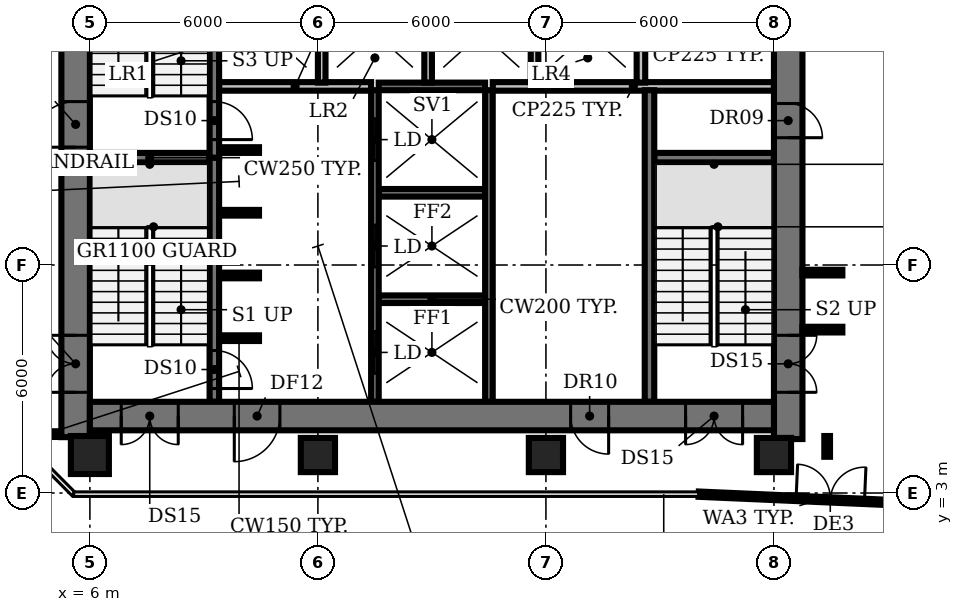
"""IFC4 building model, lengths in metres.
Left out: names, types, materials, properties, quantities, classifications, styles, units other than length and angle.
Written with IfcOpenShell. Run it as: python <this file> out.ifc"""

import sys

from ifc_helpers import new_model, si_unit, direction, frame, frame_2d, origin, origin_2d, place, context, subcontext, project, spatial, rectangle, circle, extrude, element, fill, save


model = new_model("IFC4")
c1 = context("Model", 3, precision=1e-05, world=origin(), true_north=direction((0.0, 1.0)))
c2 = subcontext(c1, "Body", "Model", "MODEL_VIEW")
j1 = project(units=[si_unit("LENGTHUNIT", "METRE"), si_unit("PLANEANGLEUNIT", "RADIAN")], contexts=[c1])
p1 = place(None, origin())
s1 = spatial("IfcSite", under=j1, at=p1, CompositionType="ELEMENT")
p2 = place(p1, origin())
s2 = spatial("IfcBuilding", under=s1, at=p2, CompositionType="ELEMENT")
p3 = place(p2, frame((0.0, 0.0, 121.4)))
s3 = spatial("IfcBuildingStorey", under=s2, at=p3, CompositionType="ELEMENT", Elevation=121.4)
p4 = place(p3, frame((6.0, 4.0, 0.0), z_axis=(0.0, 0.0, 1.0), x_axis=(1.0, 0.0, 0.0)))
e1 = element("IfcColumn", 1, at=p4, inside=s3, PredefinedType="COLUMN", context=c2, shape_type="SweptSolid", body=[
    extrude(circle(Radius=0.5, at=origin_2d()), origin(), (0.0, 0.0, 1.0), 3.85),
])
for number, where, z_axis, x_axis in (
    (2, (12.0, 4.0, 0.0), (0.0, 0.0, 1.0), (1.0, 0.0, 0.0)),
    (3, (18.0, 4.0, 0.0), (0.0, 0.0, 1.0), (1.0, 0.0, 0.0)),
    (4, (24.0, 4.0, 0.0), (0.0, 0.0, 1.0), (1.0, 0.0, 0.0)),
):
    element("IfcColumn", number, at=place(p3, frame(where, z_axis=z_axis, x_axis=x_axis)), inside=s3, PredefinedType="COLUMN", context=c2, shape_type="SweptSolid", body=[
        extrude(rectangle(XDim=0.9, YDim=0.9, at=origin_2d()), origin(), (0.0, 0.0, 1.0), 3.85),
    ])
p5 = place(p3, frame((22.02, 2.97, 0.0), z_axis=(0.0, 0.0, 1.0), x_axis=(0.999048576726, -0.043611252471, 0.0)))
e5 = element("IfcWall", 5, at=p5, inside=s3, PredefinedType="SOLIDWALL", context=c2, shape_type="SweptSolid", body=[
    extrude(rectangle(XDim=6.332, YDim=0.14, at=frame_2d((3.166, 0.0))), origin(), (0.0, 0.0, 1.0), 3.85),
])
p6 = place(p5, frame((2.566, 0.0, 0.0)))
e6 = element("IfcOpeningElement", 6, at=p6, cuts=e5, PredefinedType="OPENING", context=c2, shape_type="SweptSolid", body=[
    extrude(rectangle(XDim=1.8, YDim=2.4, at=frame_2d((0.9, 1.2))), frame((0.0, 0.08, 0.0), z_axis=(0.0, -1.0, 0.0), x_axis=(1.0, 0.0, 0.0)), (0.0, 0.0, 1.0), 0.16),
])
p7 = place(p3, frame((9.4, 7.075, 0.0), z_axis=(0.0, 0.0, 1.0), x_axis=(1.0, 0.0, 0.0)))
e7 = element("IfcWall", 7, at=p7, inside=s3, PredefinedType="SHEAR", context=c2, shape_type="SweptSolid", body=[
    extrude(rectangle(XDim=1.05, YDim=0.15, at=frame_2d((0.525, 0.0))), origin(), (0.0, 0.0, 1.0), 3.85),
])
p8 = place(p3, frame((13.6, 8.1, 0.0), z_axis=(0.0, 0.0, 1.0), x_axis=(1.0, 0.0, 0.0)))
e8 = element("IfcWall", 8, at=p8, inside=s3, PredefinedType="SHEAR", context=c2, shape_type="SweptSolid", body=[
    extrude(rectangle(XDim=2.8, YDim=0.2, at=frame_2d((1.4, 0.0))), origin(), (0.0, 0.0, 1.0), 3.85),
])
for number, where, z_axis, x_axis in (
    (9, (9.4, 8.725, 0.0), (0.0, 0.0, 1.0), (1.0, 0.0, 0.0)),
    (10, (9.4, 10.375, 0.0), (0.0, 0.0, 1.0), (1.0, 0.0, 0.0)),
):
    element("IfcWall", number, at=place(p3, frame(where, z_axis=z_axis, x_axis=x_axis)), inside=s3, PredefinedType="SHEAR", context=c2, shape_type="SweptSolid", body=[
        extrude(rectangle(XDim=1.05, YDim=0.15, at=frame_2d((0.525, 0.0))), origin(), (0.0, 0.0, 1.0), 3.85),
    ])
p9 = place(p3, frame((13.6, 10.9, 0.0), z_axis=(0.0, 0.0, 1.0), x_axis=(1.0, 0.0, 0.0)))
e11 = element("IfcWall", 11, at=p9, inside=s3, PredefinedType="SHEAR", context=c2, shape_type="SweptSolid", body=[
    extrude(rectangle(XDim=2.8, YDim=0.2, at=frame_2d((1.4, 0.0))), origin(), (0.0, 0.0, 1.0), 3.85),
])
for number, where, z_axis, x_axis in (
    (12, (6.0, 11.825, 0.0), (0.0, 0.0, 1.0), (1.0, 0.0, 0.0)),
    (13, (20.85, 11.825, 0.0), (0.0, 0.0, 1.0), (1.0, 0.0, 0.0)),
):
    element("IfcWall", number, at=place(p3, frame(where, z_axis=z_axis, x_axis=x_axis)), inside=s3, PredefinedType="SHEAR", context=c2, shape_type="SweptSolid", body=[
        extrude(rectangle(XDim=3.15, YDim=0.25, at=frame_2d((1.575, 0.0))), origin(), (0.0, 0.0, 1.0), 3.85),
    ])
p10 = place(p3, frame((9.4, 12.025, 0.0), z_axis=(0.0, 0.0, 1.0), x_axis=(1.0, 0.0, 0.0)))
e14 = element("IfcWall", 14, at=p10, inside=s3, PredefinedType="SHEAR", context=c2, shape_type="SweptSolid", body=[
    extrude(rectangle(XDim=1.05, YDim=0.15, at=frame_2d((0.525, 0.0))), origin(), (0.0, 0.0, 1.0), 3.85),
])
p11 = place(p3, frame((9.4, 13.7, 0.0), z_axis=(0.0, 0.0, 1.0), x_axis=(1.0, 0.0, 0.0)))
e15 = element("IfcWall", 15, at=p11, inside=s3, PredefinedType="PARTITIONING", context=c2, shape_type="SweptSolid", body=[
    extrude(rectangle(XDim=4.0, YDim=0.225, at=frame_2d((2.0, 0.0))), origin(), (0.0, 0.0, 1.0), 3.85),
])
p12 = place(p3, frame((13.6, 13.7, 0.0), z_axis=(0.0, 0.0, 1.0), x_axis=(1.0, 0.0, 0.0)))
e16 = element("IfcWall", 16, at=p12, inside=s3, PredefinedType="SHEAR", context=c2, shape_type="SweptSolid", body=[
    extrude(rectangle(XDim=2.8, YDim=0.2, at=frame_2d((1.4, 0.0))), origin(), (0.0, 0.0, 1.0), 3.85),
])
p13 = place(p3, frame((16.6, 13.7, 0.0), z_axis=(0.0, 0.0, 1.0), x_axis=(1.0, 0.0, 0.0)))
e17 = element("IfcWall", 17, at=p13, inside=s3, PredefinedType="PARTITIONING", context=c2, shape_type="SweptSolid", body=[
    extrude(rectangle(XDim=7.4, YDim=0.225, at=frame_2d((3.7, 0.0))), origin(), (0.0, 0.0, 1.0), 3.85),
])
p14 = place(p3, frame((9.275, 11.825, 0.0), z_axis=(0.0, 0.0, 1.0), x_axis=(0.0, -1.0, 0.0)))
e18 = element("IfcWall", 18, at=p14, inside=s3, PredefinedType="SHEAR", context=c2, shape_type="SweptSolid", body=[
    extrude(rectangle(XDim=6.425, YDim=0.25, at=frame_2d((3.212, 0.0))), origin(), (0.0, 0.0, 1.0), 3.85),
])
p15 = place(p14, frame((5.075, 0.0, 0.0)))
e19 = element("IfcOpeningElement", 19, at=p15, cuts=e18, PredefinedType="OPENING", context=c2, shape_type="SweptSolid", body=[
    extrude(rectangle(XDim=1.0, YDim=2.1, at=frame_2d((0.5, 1.05))), frame((0.0, 0.135, 0.0), z_axis=(0.0, -1.0, 0.0), x_axis=(1.0, 0.0, 0.0)), (0.0, 0.0, 1.0), 0.27),
])
p16 = place(p3, frame((9.275, 18.375, 0.0), z_axis=(0.0, 0.0, 1.0), x_axis=(0.0, -1.0, 0.0)))
e20 = element("IfcWall", 20, at=p16, inside=s3, PredefinedType="SHEAR", context=c2, shape_type="SweptSolid", body=[
    extrude(rectangle(XDim=6.55, YDim=0.25, at=frame_2d((3.275, 0.0))), origin(), (0.0, 0.0, 1.0), 3.85),
])
p17 = place(p16, frame((5.075, 0.0, 0.0)))
e21 = element("IfcOpeningElement", 21, at=p17, cuts=e20, PredefinedType="OPENING", context=c2, shape_type="SweptSolid", body=[
    extrude(rectangle(XDim=1.0, YDim=2.1, at=frame_2d((0.5, 1.05))), frame((0.0, 0.135, 0.0), z_axis=(0.0, -1.0, 0.0), x_axis=(1.0, 0.0, 0.0)), (0.0, 0.0, 1.0), 0.27),
])
p18 = place(p3, frame((12.1, 13.8, 0.0), z_axis=(0.0, 0.0, 1.0), x_axis=(0.0, 1.0, 0.0)))
e22 = element("IfcWall", 22, at=p18, inside=s3, PredefinedType="SOLIDWALL", context=c2, shape_type="SweptSolid", body=[
    extrude(rectangle(XDim=2.6, YDim=0.2, at=frame_2d((1.3, 0.0))), origin(), (0.0, 0.0, 1.0), 3.85),
])
p19 = place(p3, frame((13.5, 5.4, 0.0), z_axis=(0.0, 0.0, 1.0), x_axis=(0.0, 1.0, 0.0)))
e23 = element("IfcWall", 23, at=p19, inside=s3, PredefinedType="SHEAR", context=c2, shape_type="SweptSolid", body=[
    extrude(rectangle(XDim=8.2, YDim=0.2, at=frame_2d((4.1, 0.0))), origin(), (0.0, 0.0, 1.0), 3.85),
])
p20 = place(p19, frame((0.75, 0.0, 0.0)))
e24 = element("IfcOpeningElement", 24, at=p20, cuts=e23, PredefinedType="OPENING", context=c2, shape_type="SweptSolid", body=[
    extrude(rectangle(XDim=1.1, YDim=2.1, at=frame_2d((0.55, 1.05))), frame((0.0, 0.11, 0.0), z_axis=(0.0, -1.0, 0.0), x_axis=(1.0, 0.0, 0.0)), (0.0, 0.0, 1.0), 0.22),
])
p21 = place(p19, frame((3.55, 0.0, 0.0)))
e25 = element("IfcOpeningElement", 25, at=p21, cuts=e23, PredefinedType="OPENING", context=c2, shape_type="SweptSolid", body=[
    extrude(rectangle(XDim=1.1, YDim=2.1, at=frame_2d((0.55, 1.05))), frame((0.0, 0.11, 0.0), z_axis=(0.0, -1.0, 0.0), x_axis=(1.0, 0.0, 0.0)), (0.0, 0.0, 1.0), 0.22),
])
p22 = place(p19, frame((6.35, 0.0, 0.0)))
e26 = element("IfcOpeningElement", 26, at=p22, cuts=e23, PredefinedType="OPENING", context=c2, shape_type="SweptSolid", body=[
    extrude(rectangle(XDim=1.1, YDim=2.1, at=frame_2d((0.55, 1.05))), frame((0.0, 0.11, 0.0), z_axis=(0.0, -1.0, 0.0), x_axis=(1.0, 0.0, 0.0)), (0.0, 0.0, 1.0), 0.22),
])
p23 = place(p3, frame((14.9, 13.8, 0.0), z_axis=(0.0, 0.0, 1.0), x_axis=(0.0, 1.0, 0.0)))
e27 = element("IfcWall", 27, at=p23, inside=s3, PredefinedType="SOLIDWALL", context=c2, shape_type="SweptSolid", body=[
    extrude(rectangle(XDim=2.6, YDim=0.2, at=frame_2d((1.3, 0.0))), origin(), (0.0, 0.0, 1.0), 3.85),
])
p24 = place(p3, frame((16.5, 5.4, 0.0), z_axis=(0.0, 0.0, 1.0), x_axis=(0.0, 1.0, 0.0)))
e28 = element("IfcWall", 28, at=p24, inside=s3, PredefinedType="SHEAR", context=c2, shape_type="SweptSolid", body=[
    extrude(rectangle(XDim=8.2, YDim=0.2, at=frame_2d((4.1, 0.0))), origin(), (0.0, 0.0, 1.0), 3.85),
])
p25 = place(p3, frame((17.7, 13.8, 0.0), z_axis=(0.0, 0.0, 1.0), x_axis=(0.0, 1.0, 0.0)))
e29 = element("IfcWall", 29, at=p25, inside=s3, PredefinedType="SOLIDWALL", context=c2, shape_type="SweptSolid", body=[
    extrude(rectangle(XDim=2.6, YDim=0.2, at=frame_2d((1.3, 0.0))), origin(), (0.0, 0.0, 1.0), 3.85),
])
p26 = place(p3, frame((20.5, 13.8, 0.0), z_axis=(0.0, 0.0, 1.0), x_axis=(0.0, 1.0, 0.0)))
e30 = element("IfcWall", 30, at=p26, inside=s3, PredefinedType="PARTITIONING", context=c2, shape_type="SweptSolid", body=[
    extrude(rectangle(XDim=2.6, YDim=0.225, at=frame_2d((1.3, 0.0))), origin(), (0.0, 0.0, 1.0), 3.85),
])
p27 = place(p3, frame((20.725, 5.4, 0.0), z_axis=(0.0, 0.0, 1.0), x_axis=(0.0, 1.0, 0.0)))
e31 = element("IfcWall", 31, at=p27, inside=s3, PredefinedType="SHEAR", context=c2, shape_type="SweptSolid", body=[
    extrude(rectangle(XDim=8.2, YDim=0.25, at=frame_2d((4.1, 0.0))), origin(), (0.0, 0.0, 1.0), 3.85),
])
p28 = place(p3, frame((5.625, 4.47, 0.0), z_axis=(0.0, 0.0, 1.0), x_axis=(0.0, 1.0, 0.0)))
e32 = element("IfcWall", 32, at=p28, inside=s3, PredefinedType="SHEAR", context=c2, shape_type="SweptSolid", body=[
    extrude(rectangle(XDim=21.08, YDim=0.75, at=frame_2d((10.54, 0.0))), origin(), (0.0, 0.0, 1.0), 3.85),
])
p29 = place(p28, frame((1.18, 0.0, 0.0)))
e33 = element("IfcOpeningElement", 33, at=p29, cuts=e32, PredefinedType="OPENING", context=c2, shape_type="SweptSolid", body=[
    extrude(rectangle(XDim=1.5, YDim=2.1, at=frame_2d((0.75, 1.05))), frame((0.0, 0.385, 0.0), z_axis=(0.0, -1.0, 0.0), x_axis=(1.0, 0.0, 0.0)), (0.0, 0.0, 1.0), 0.77),
])
p30 = place(p28, frame((7.63, 0.0, 0.0)))
e34 = element("IfcOpeningElement", 34, at=p30, cuts=e32, PredefinedType="OPENING", context=c2, shape_type="SweptSolid", body=[
    extrude(rectangle(XDim=1.2, YDim=2.1, at=frame_2d((0.6, 1.05))), frame((0.0, 0.385, 0.0), z_axis=(0.0, -1.0, 0.0), x_axis=(1.0, 0.0, 0.0)), (0.0, 0.0, 1.0), 0.77),
])
p31 = place(p28, frame((14.18, 0.0, 0.0)))
e35 = element("IfcOpeningElement", 35, at=p31, cuts=e32, PredefinedType="OPENING", context=c2, shape_type="SweptSolid", body=[
    extrude(rectangle(XDim=1.2, YDim=2.1, at=frame_2d((0.6, 1.05))), frame((0.0, 0.385, 0.0), z_axis=(0.0, -1.0, 0.0), x_axis=(1.0, 0.0, 0.0)), (0.0, 0.0, 1.0), 0.77),
])
p32 = place(p3, frame((24.375, 25.55, 0.0), z_axis=(0.0, 0.0, 1.0), x_axis=(0.0, -1.0, 0.0)))
e36 = element("IfcWall", 36, at=p32, inside=s3, PredefinedType="SHEAR", context=c2, shape_type="SweptSolid", body=[
    extrude(rectangle(XDim=21.13, YDim=0.75, at=frame_2d((10.565, 0.0))), origin(), (0.0, 0.0, 1.0), 3.85),
])
p33 = place(p32, frame((18.4, 0.0, 0.0)))
e37 = element("IfcOpeningElement", 37, at=p33, cuts=e36, PredefinedType="OPENING", context=c2, shape_type="SweptSolid", body=[
    extrude(rectangle(XDim=1.5, YDim=2.1, at=frame_2d((0.75, 1.05))), frame((0.0, 0.385, 0.0), z_axis=(0.0, -1.0, 0.0), x_axis=(1.0, 0.0, 0.0)), (0.0, 0.0, 1.0), 0.77),
])
p34 = place(p32, frame((12.3, 0.0, 0.0)))
e38 = element("IfcOpeningElement", 38, at=p34, cuts=e36, PredefinedType="OPENING", context=c2, shape_type="SweptSolid", body=[
    extrude(rectangle(XDim=0.9, YDim=2.1, at=frame_2d((0.45, 1.05))), frame((0.0, 0.385, 0.0), z_axis=(0.0, -1.0, 0.0), x_axis=(1.0, 0.0, 0.0)), (0.0, 0.0, 1.0), 0.77),
])
p35 = place(p32, frame((6.3, 0.0, 0.0)))
e39 = element("IfcOpeningElement", 39, at=p35, cuts=e36, PredefinedType="OPENING", context=c2, shape_type="SweptSolid", body=[
    extrude(rectangle(XDim=2.0, YDim=2.1, at=frame_2d((1.0, 1.05))), frame((0.0, 0.385, 0.0), z_axis=(0.0, -1.0, 0.0), x_axis=(1.0, 0.0, 0.0)), (0.0, 0.0, 1.0), 0.77),
])
p36 = place(p3, frame((24.0, 5.025, 0.0), z_axis=(0.0, 0.0, 1.0), x_axis=(-1.0, 0.0, 0.0)))
e40 = element("IfcWall", 40, at=p36, inside=s3, PredefinedType="SHEAR", context=c2, shape_type="SweptSolid", body=[
    extrude(rectangle(XDim=18.0, YDim=0.75, at=frame_2d((9.0, 0.0))), origin(), (0.0, 0.0, 1.0), 3.85),
])
p37 = place(p36, frame((0.825, 0.0, 0.0)))
e41 = element("IfcOpeningElement", 41, at=p37, cuts=e40, PredefinedType="OPENING", context=c2, shape_type="SweptSolid", body=[
    extrude(rectangle(XDim=1.5, YDim=2.1, at=frame_2d((0.75, 1.05))), frame((0.0, 0.385, 0.0), z_axis=(0.0, -1.0, 0.0), x_axis=(1.0, 0.0, 0.0)), (0.0, 0.0, 1.0), 0.77),
])
p38 = place(p36, frame((15.675, 0.0, 0.0)))
e42 = element("IfcOpeningElement", 42, at=p38, cuts=e40, PredefinedType="OPENING", context=c2, shape_type="SweptSolid", body=[
    extrude(rectangle(XDim=1.5, YDim=2.1, at=frame_2d((0.75, 1.05))), frame((0.0, 0.385, 0.0), z_axis=(0.0, -1.0, 0.0), x_axis=(1.0, 0.0, 0.0)), (0.0, 0.0, 1.0), 0.77),
])
p39 = place(p36, frame((13.0, 0.0, 0.0)))
e43 = element("IfcOpeningElement", 43, at=p39, cuts=e40, PredefinedType="OPENING", context=c2, shape_type="SweptSolid", body=[
    extrude(rectangle(XDim=1.2, YDim=2.1, at=frame_2d((0.6, 1.05))), frame((0.0, 0.385, 0.0), z_axis=(0.0, -1.0, 0.0), x_axis=(1.0, 0.0, 0.0)), (0.0, 0.0, 1.0), 0.77),
])
p40 = place(p36, frame((4.35, 0.0, 0.0)))
e44 = element("IfcOpeningElement", 44, at=p40, cuts=e40, PredefinedType="OPENING", context=c2, shape_type="SweptSolid", body=[
    extrude(rectangle(XDim=1.0, YDim=2.1, at=frame_2d((0.5, 1.05))), frame((0.0, 0.385, 0.0), z_axis=(0.0, -1.0, 0.0), x_axis=(1.0, 0.0, 0.0)), (0.0, 0.0, 1.0), 0.77),
])
p41 = place(p3, frame((4.07, 4.55, 0.0), z_axis=(0.0, 0.0, 1.0), x_axis=(1.0, 0.0, 0.0)))
e45 = element("IfcWall", 45, at=p41, inside=s3, PredefinedType="PARTITIONING", context=c2, shape_type="SweptSolid", body=[
    extrude(rectangle(XDim=1.08, YDim=0.15, at=frame_2d((0.54, 0.0))), origin(), (0.0, 0.0, 1.0), 2.83),
])
for number, where, z_axis, x_axis in (
    (46, (24.75, 7.3, 0.0), (0.0, 0.0, 1.0), (1.0, 0.0, 0.0)),
    (47, (24.75, 8.8, 0.0), (0.0, 0.0, 1.0), (1.0, 0.0, 0.0)),
):
    element("IfcWall", number, at=place(p3, frame(where, z_axis=z_axis, x_axis=x_axis)), inside=s3, PredefinedType="PARTITIONING", context=c2, shape_type="SweptSolid", body=[
        extrude(rectangle(XDim=1.05, YDim=0.15, at=frame_2d((0.525, 0.0))), origin(), (0.0, 0.0, 1.0), 2.83),
    ])
p42 = place(p3, frame((25.4, 3.954, 0.0), z_axis=(0.0, 0.0, 1.0), x_axis=(0.0, 1.0, 0.0)))
e48 = element("IfcWall", 48, at=p42, inside=s3, PredefinedType="PARTITIONING", context=c2, shape_type="SweptSolid", body=[
    extrude(rectangle(XDim=0.546, YDim=0.15, at=frame_2d((0.273, 0.0))), origin(), (0.0, 0.0, 1.0), 2.83),
])
p43 = place(p6, origin())
e49 = element("IfcDoor", 49, at=p43, inside=s3, OperationType="DOUBLE_DOOR_DOUBLE_SWING", PredefinedType="DOOR", context=c2, shape_type="SweptSolid", body=[
    extrude(rectangle(XDim=1.8, YDim=2.4, at=frame_2d((0.9, 1.2))), frame((0.0, 0.025, 0.0), z_axis=(0.0, -1.0, 0.0), x_axis=(1.0, 0.0, 0.0)), (0.0, 0.0, 1.0), 0.05),
])
fill(e6, e49)
p44 = place(p15, origin())
e50 = element("IfcDoor", 50, at=p44, inside=s3, OperationType="SINGLE_SWING_RIGHT", PredefinedType="DOOR", context=c2, shape_type="SweptSolid", body=[
    extrude(rectangle(XDim=1.0, YDim=2.1, at=frame_2d((0.5, 1.05))), frame((0.0, 0.025, 0.0), z_axis=(0.0, -1.0, 0.0), x_axis=(1.0, 0.0, 0.0)), (0.0, 0.0, 1.0), 0.05),
])
fill(e19, e50)
p45 = place(p17, origin())
e51 = element("IfcDoor", 51, at=p45, inside=s3, OperationType="SINGLE_SWING_RIGHT", PredefinedType="DOOR", context=c2, shape_type="SweptSolid", body=[
    extrude(rectangle(XDim=1.0, YDim=2.1, at=frame_2d((0.5, 1.05))), frame((0.0, 0.025, 0.0), z_axis=(0.0, -1.0, 0.0), x_axis=(1.0, 0.0, 0.0)), (0.0, 0.0, 1.0), 0.05),
])
fill(e21, e51)
p46 = place(p20, origin())
e52 = element("IfcDoor", 52, at=p46, inside=s3, OperationType="DOUBLE_DOOR_SLIDING", PredefinedType="DOOR", context=c2, shape_type="SweptSolid", body=[
    extrude(rectangle(XDim=1.1, YDim=2.1, at=frame_2d((0.55, 1.05))), frame((0.0, 0.025, 0.0), z_axis=(0.0, -1.0, 0.0), x_axis=(1.0, 0.0, 0.0)), (0.0, 0.0, 1.0), 0.05),
])
fill(e24, e52)
p47 = place(p21, origin())
e53 = element("IfcDoor", 53, at=p47, inside=s3, OperationType="DOUBLE_DOOR_SLIDING", PredefinedType="DOOR", context=c2, shape_type="SweptSolid", body=[
    extrude(rectangle(XDim=1.1, YDim=2.1, at=frame_2d((0.55, 1.05))), frame((0.0, 0.025, 0.0), z_axis=(0.0, -1.0, 0.0), x_axis=(1.0, 0.0, 0.0)), (0.0, 0.0, 1.0), 0.05),
])
fill(e25, e53)
p48 = place(p22, origin())
e54 = element("IfcDoor", 54, at=p48, inside=s3, OperationType="DOUBLE_DOOR_SLIDING", PredefinedType="DOOR", context=c2, shape_type="SweptSolid", body=[
    extrude(rectangle(XDim=1.1, YDim=2.1, at=frame_2d((0.55, 1.05))), frame((0.0, 0.025, 0.0), z_axis=(0.0, -1.0, 0.0), x_axis=(1.0, 0.0, 0.0)), (0.0, 0.0, 1.0), 0.05),
])
fill(e26, e54)
p49 = place(p29, origin())
e55 = element("IfcDoor", 55, at=p49, inside=s3, OperationType="DOUBLE_DOOR_SINGLE_SWING", PredefinedType="DOOR", context=c2, shape_type="SweptSolid", body=[
    extrude(rectangle(XDim=1.5, YDim=2.1, at=frame_2d((0.75, 1.05))), frame((0.0, 0.025, 0.0), z_axis=(0.0, -1.0, 0.0), x_axis=(1.0, 0.0, 0.0)), (0.0, 0.0, 1.0), 0.05),
])
fill(e33, e55)
p50 = place(p30, origin())
e56 = element("IfcDoor", 56, at=p50, inside=s3, OperationType="SINGLE_SWING_LEFT", PredefinedType="DOOR", context=c2, shape_type="SweptSolid", body=[
    extrude(rectangle(XDim=1.2, YDim=2.1, at=frame_2d((0.6, 1.05))), frame((0.0, 0.025, 0.0), z_axis=(0.0, -1.0, 0.0), x_axis=(1.0, 0.0, 0.0)), (0.0, 0.0, 1.0), 0.05),
])
fill(e34, e56)
p51 = place(p33, origin())
e57 = element("IfcDoor", 57, at=p51, inside=s3, OperationType="DOUBLE_DOOR_SINGLE_SWING", PredefinedType="DOOR", context=c2, shape_type="SweptSolid", body=[
    extrude(rectangle(XDim=1.5, YDim=2.1, at=frame_2d((0.75, 1.05))), frame((0.0, 0.025, 0.0), z_axis=(0.0, -1.0, 0.0), x_axis=(1.0, 0.0, 0.0)), (0.0, 0.0, 1.0), 0.05),
])
fill(e37, e57)
p52 = place(p34, origin())
e58 = element("IfcDoor", 58, at=p52, inside=s3, OperationType="SINGLE_SWING_RIGHT", PredefinedType="DOOR", context=c2, shape_type="SweptSolid", body=[
    extrude(rectangle(XDim=0.9, YDim=2.1, at=frame_2d((0.45, 1.05))), frame((0.0, -0.315, 0.0), z_axis=(0.0, -1.0, 0.0), x_axis=(1.0, 0.0, 0.0)), (0.0, 0.0, 1.0), 0.05),
])
fill(e38, e58)
p53 = place(p37, origin())
e59 = element("IfcDoor", 59, at=p53, inside=s3, OperationType="DOUBLE_DOOR_SINGLE_SWING", PredefinedType="DOOR", context=c2, shape_type="SweptSolid", body=[
    extrude(rectangle(XDim=1.5, YDim=2.1, at=frame_2d((0.75, 1.05))), frame((0.0, 0.025, 0.0), z_axis=(0.0, -1.0, 0.0), x_axis=(1.0, 0.0, 0.0)), (0.0, 0.0, 1.0), 0.05),
])
fill(e41, e59)
p54 = place(p38, origin())
e60 = element("IfcDoor", 60, at=p54, inside=s3, OperationType="DOUBLE_DOOR_SINGLE_SWING", PredefinedType="DOOR", context=c2, shape_type="SweptSolid", body=[
    extrude(rectangle(XDim=1.5, YDim=2.1, at=frame_2d((0.75, 1.05))), frame((0.0, 0.025, 0.0), z_axis=(0.0, -1.0, 0.0), x_axis=(1.0, 0.0, 0.0)), (0.0, 0.0, 1.0), 0.05),
])
fill(e42, e60)
p55 = place(p39, origin())
e61 = element("IfcDoor", 61, at=p55, inside=s3, OperationType="SINGLE_SWING_RIGHT", PredefinedType="DOOR", context=c2, shape_type="SweptSolid", body=[
    extrude(rectangle(XDim=1.2, YDim=2.1, at=frame_2d((0.6, 1.05))), frame((0.0, 0.025, 0.0), z_axis=(0.0, -1.0, 0.0), x_axis=(1.0, 0.0, 0.0)), (0.0, 0.0, 1.0), 0.05),
])
fill(e43, e61)
p56 = place(p40, origin())
e62 = element("IfcDoor", 62, at=p56, inside=s3, OperationType="SINGLE_SWING_LEFT", PredefinedType="DOOR", context=c2, shape_type="SweptSolid", body=[
    extrude(rectangle(XDim=1.0, YDim=2.1, at=frame_2d((0.5, 1.05))), frame((0.0, -0.315, 0.0), z_axis=(0.0, -1.0, 0.0), x_axis=(1.0, 0.0, 0.0)), (0.0, 0.0, 1.0), 0.05),
])
fill(e44, e62)
save(model, sys.argv[1])
